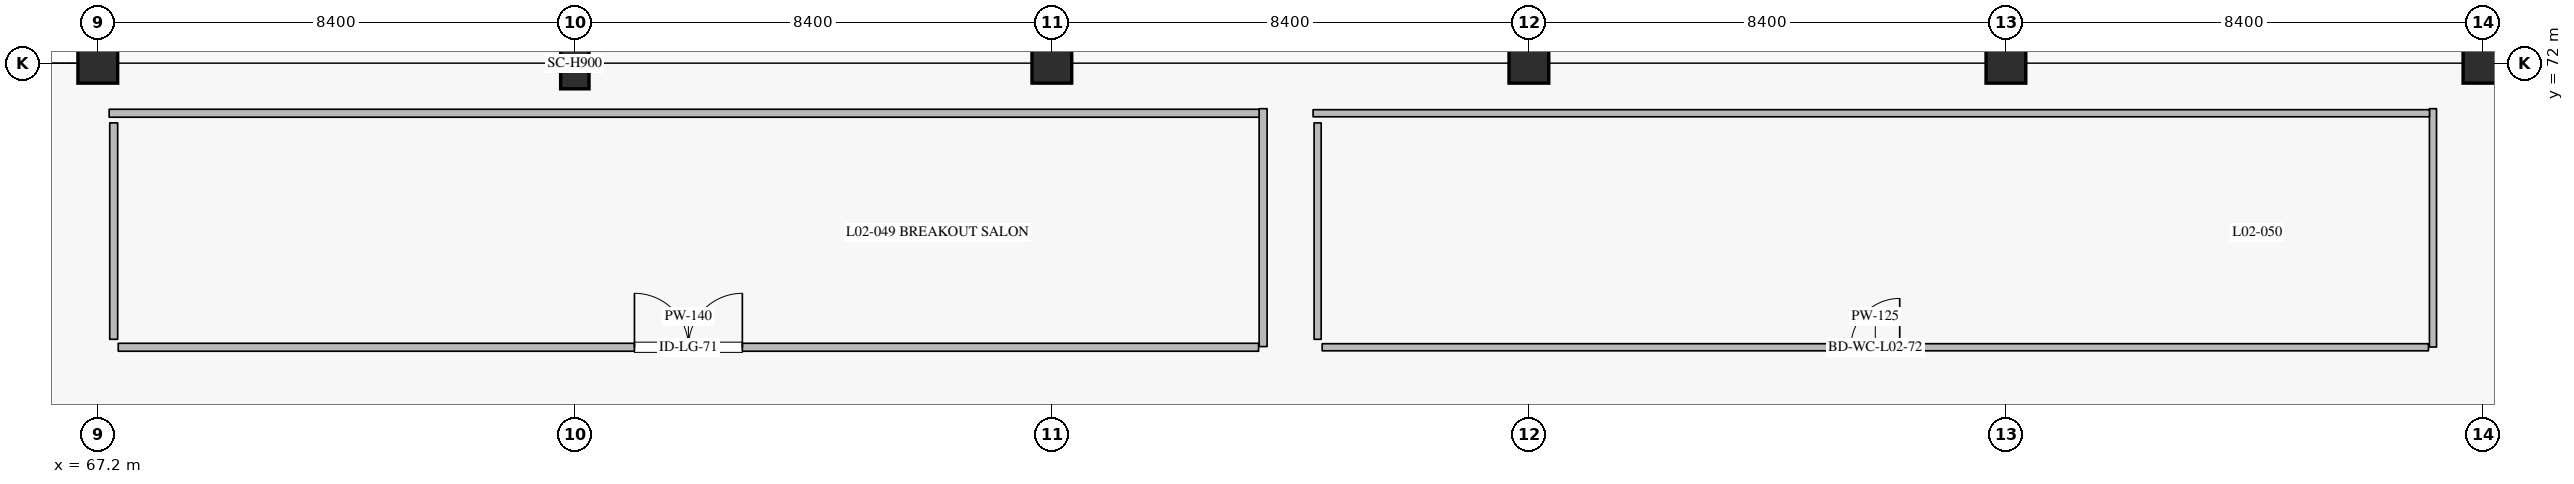
"""IFC4 building model, lengths in metres.
Left out: names, types, materials, properties, quantities, classifications, styles, units other than length and angle.
Written with IfcOpenShell. Run it as: python <this file> out.ifc"""

import sys

from ifc_helpers import new_model, si_unit, direction, frame, frame_2d, origin, origin_2d, place, context, subcontext, project, spatial, rectangle, hollow_rectangle, extrude, element, fill, save


model = new_model("IFC4")
c1 = context("Model", 3, precision=1e-05, world=origin(), true_north=direction((0.0, 1.0)))
c2 = subcontext(c1, "Body", "Model", "MODEL_VIEW")
j1 = project(units=[si_unit("LENGTHUNIT", "METRE"), si_unit("PLANEANGLEUNIT", "RADIAN")], contexts=[c1])
p1 = place(None, origin())
s1 = spatial("IfcSite", under=j1, at=p1, CompositionType="ELEMENT")
p2 = place(p1, origin())
s2 = spatial("IfcBuilding", under=s1, at=p2, CompositionType="ELEMENT")
p3 = place(p2, frame((0.0, 0.0, 11.4)))
s3 = spatial("IfcBuildingStorey", under=s2, at=p3, CompositionType="ELEMENT", Elevation=11.4)
p4 = place(p3, frame((67.2, 72.0, 0.0), z_axis=(0.0, 0.0, 1.0), x_axis=(1.0, 0.0, 0.0)))
e1 = element("IfcColumn", 1, at=p4, inside=s3, PredefinedType="COLUMN", context=c2, shape_type="SweptSolid", body=[
    extrude(rectangle(XDim=0.7, YDim=0.7, at=origin_2d()), origin(), (0.0, 0.0, 1.0), 4.8),
])
p5 = place(p3, frame((75.6, 72.0, 0.0), z_axis=(0.0, 0.0, 1.0), x_axis=(1.0, 0.0, 0.0)))
e2 = element("IfcColumn", 2, at=p5, inside=s3, PredefinedType="COLUMN", context=c2, shape_type="SweptSolid", body=[
    extrude(hollow_rectangle(XDim=0.5, YDim=0.9, WallThickness=0.024, at=origin_2d()), origin(), (0.0, 0.0, 1.0), 4.8),
])
for number, where, z_axis, x_axis in (
    (3, (84.0, 72.0, 0.0), (0.0, 0.0, 1.0), (1.0, 0.0, 0.0)),
    (4, (92.4, 72.0, 0.0), (0.0, 0.0, 1.0), (1.0, 0.0, 0.0)),
    (5, (100.8, 72.0, 0.0), (0.0, 0.0, 1.0), (1.0, 0.0, 0.0)),
    (6, (109.2, 72.0, 0.0), (0.0, 0.0, 1.0), (1.0, 0.0, 0.0)),
):
    element("IfcColumn", number, at=place(p3, frame(where, z_axis=z_axis, x_axis=x_axis)), inside=s3, PredefinedType="COLUMN", context=c2, shape_type="SweptSolid", body=[
        extrude(rectangle(XDim=0.7, YDim=0.7, at=origin_2d()), origin(), (0.0, 0.0, 1.0), 4.8),
    ])
p6 = place(p3, frame((67.56, 67.0, 0.0), z_axis=(0.0, 0.0, 1.0), x_axis=(1.0, 0.0, 0.0)))
e7 = element("IfcWall", 7, at=p6, inside=s3, PredefinedType="PARTITIONING", context=c2, shape_type="SweptSolid", body=[
    extrude(rectangle(XDim=20.08, YDim=0.14, at=frame_2d((10.04, 0.0))), origin(), (0.0, 0.0, 1.0), 4.535),
])
p7 = place(p6, frame((9.09, 0.0, 0.0)))
e8 = element("IfcOpeningElement", 8, at=p7, cuts=e7, PredefinedType="OPENING", context=c2, shape_type="SweptSolid", body=[
    extrude(rectangle(XDim=1.9, YDim=2.4, at=frame_2d((0.95, 1.2))), frame((0.0, 0.08, 0.0), z_axis=(0.0, -1.0, 0.0), x_axis=(1.0, 0.0, 0.0)), (0.0, 0.0, 1.0), 0.16),
])
p8 = place(p3, frame((67.48, 67.14, 0.0), z_axis=(0.0, 0.0, 1.0), x_axis=(0.0, 1.0, 0.0)))
e9 = element("IfcWall", 9, at=p8, inside=s3, PredefinedType="PARTITIONING", context=c2, shape_type="SweptSolid", body=[
    extrude(rectangle(XDim=3.81, YDim=0.14, at=frame_2d((1.905, 0.0))), origin(), (0.0, 0.0, 1.0), 4.535),
])
p9 = place(p3, frame((88.76, 67.0, 0.0), z_axis=(0.0, 0.0, 1.0), x_axis=(1.0, 0.0, 0.0)))
e10 = element("IfcWall", 10, at=p9, inside=s3, PredefinedType="PARTITIONING", context=c2, shape_type="SweptSolid", body=[
    extrude(rectangle(XDim=19.48, YDim=0.125, at=frame_2d((9.74, 0.0))), origin(), (0.0, 0.0, 1.0), 4.535),
])
p10 = place(p9, frame((9.31, 0.0, 0.0)))
e11 = element("IfcOpeningElement", 11, at=p10, cuts=e10, PredefinedType="OPENING", context=c2, shape_type="SweptSolid", body=[
    extrude(rectangle(XDim=0.86, YDim=2.12, at=frame_2d((0.43, 1.06))), frame((0.0, 0.073, 0.0), z_axis=(0.0, -1.0, 0.0), x_axis=(1.0, 0.0, 0.0)), (0.0, 0.0, 1.0), 0.145),
])
p11 = place(p3, frame((88.68, 67.14, 0.0), z_axis=(0.0, 0.0, 1.0), x_axis=(0.0, 1.0, 0.0)))
e12 = element("IfcWall", 12, at=p11, inside=s3, PredefinedType="PARTITIONING", context=c2, shape_type="SweptSolid", body=[
    extrude(rectangle(XDim=3.81, YDim=0.125, at=frame_2d((1.905, 0.0))), origin(), (0.0, 0.0, 1.0), 4.535),
])
p12 = place(p3, frame((87.72, 67.012, 0.0), z_axis=(0.0, 0.0, 1.0), x_axis=(0.0, 1.0, 0.0)))
e13 = element("IfcWall", 13, at=p12, inside=s3, PredefinedType="PARTITIONING", context=c2, shape_type="SweptSolid", body=[
    extrude(rectangle(XDim=4.188, YDim=0.14, at=frame_2d((2.094, 0.0))), origin(), (0.0, 0.0, 1.0), 4.535),
])
p13 = place(p3, frame((67.4, 71.12, 0.0), z_axis=(0.0, 0.0, 1.0), x_axis=(1.0, 0.0, 0.0)))
e14 = element("IfcWall", 14, at=p13, inside=s3, PredefinedType="PARTITIONING", context=c2, shape_type="SweptSolid", body=[
    extrude(rectangle(XDim=20.25, YDim=0.14, at=frame_2d((10.125, 0.0))), origin(), (0.0, 0.0, 1.0), 4.535),
])
p14 = place(p3, frame((108.32, 67.004, 0.0), z_axis=(0.0, 0.0, 1.0), x_axis=(0.0, 1.0, 0.0)))
e15 = element("IfcWall", 15, at=p14, inside=s3, PredefinedType="PARTITIONING", context=c2, shape_type="SweptSolid", body=[
    extrude(rectangle(XDim=4.196, YDim=0.125, at=frame_2d((2.098, 0.0))), origin(), (0.0, 0.0, 1.0), 4.535),
])
p15 = place(p3, frame((88.6, 71.12, 0.0), z_axis=(0.0, 0.0, 1.0), x_axis=(1.0, 0.0, 0.0)))
e16 = element("IfcWall", 16, at=p15, inside=s3, PredefinedType="PARTITIONING", context=c2, shape_type="SweptSolid", body=[
    extrude(rectangle(XDim=19.658, YDim=0.125, at=frame_2d((9.829, 0.0))), origin(), (0.0, 0.0, 1.0), 4.535),
])
p16 = place(p7, origin())
e17 = element("IfcDoor", 17, at=p16, inside=s3, OperationType="DOUBLE_DOOR_SINGLE_SWING", PredefinedType="DOOR", context=c2, shape_type="SweptSolid", body=[
    extrude(rectangle(XDim=1.9, YDim=2.4, at=frame_2d((0.95, 1.2))), frame((0.0, 0.025, 0.0), z_axis=(0.0, -1.0, 0.0), x_axis=(1.0, 0.0, 0.0)), (0.0, 0.0, 1.0), 0.05),
])
fill(e8, e17)
p17 = place(p10, origin())
e18 = element("IfcDoor", 18, at=p17, inside=s3, OperationType="SINGLE_SWING_RIGHT", PredefinedType="DOOR", context=c2, shape_type="SweptSolid", body=[
    extrude(rectangle(XDim=0.86, YDim=2.12, at=frame_2d((0.43, 1.06))), frame((0.0, 0.025, 0.0), z_axis=(0.0, -1.0, 0.0), x_axis=(1.0, 0.0, 0.0)), (0.0, 0.0, 1.0), 0.05),
])
fill(e11, e18)
save(model, sys.argv[1])
